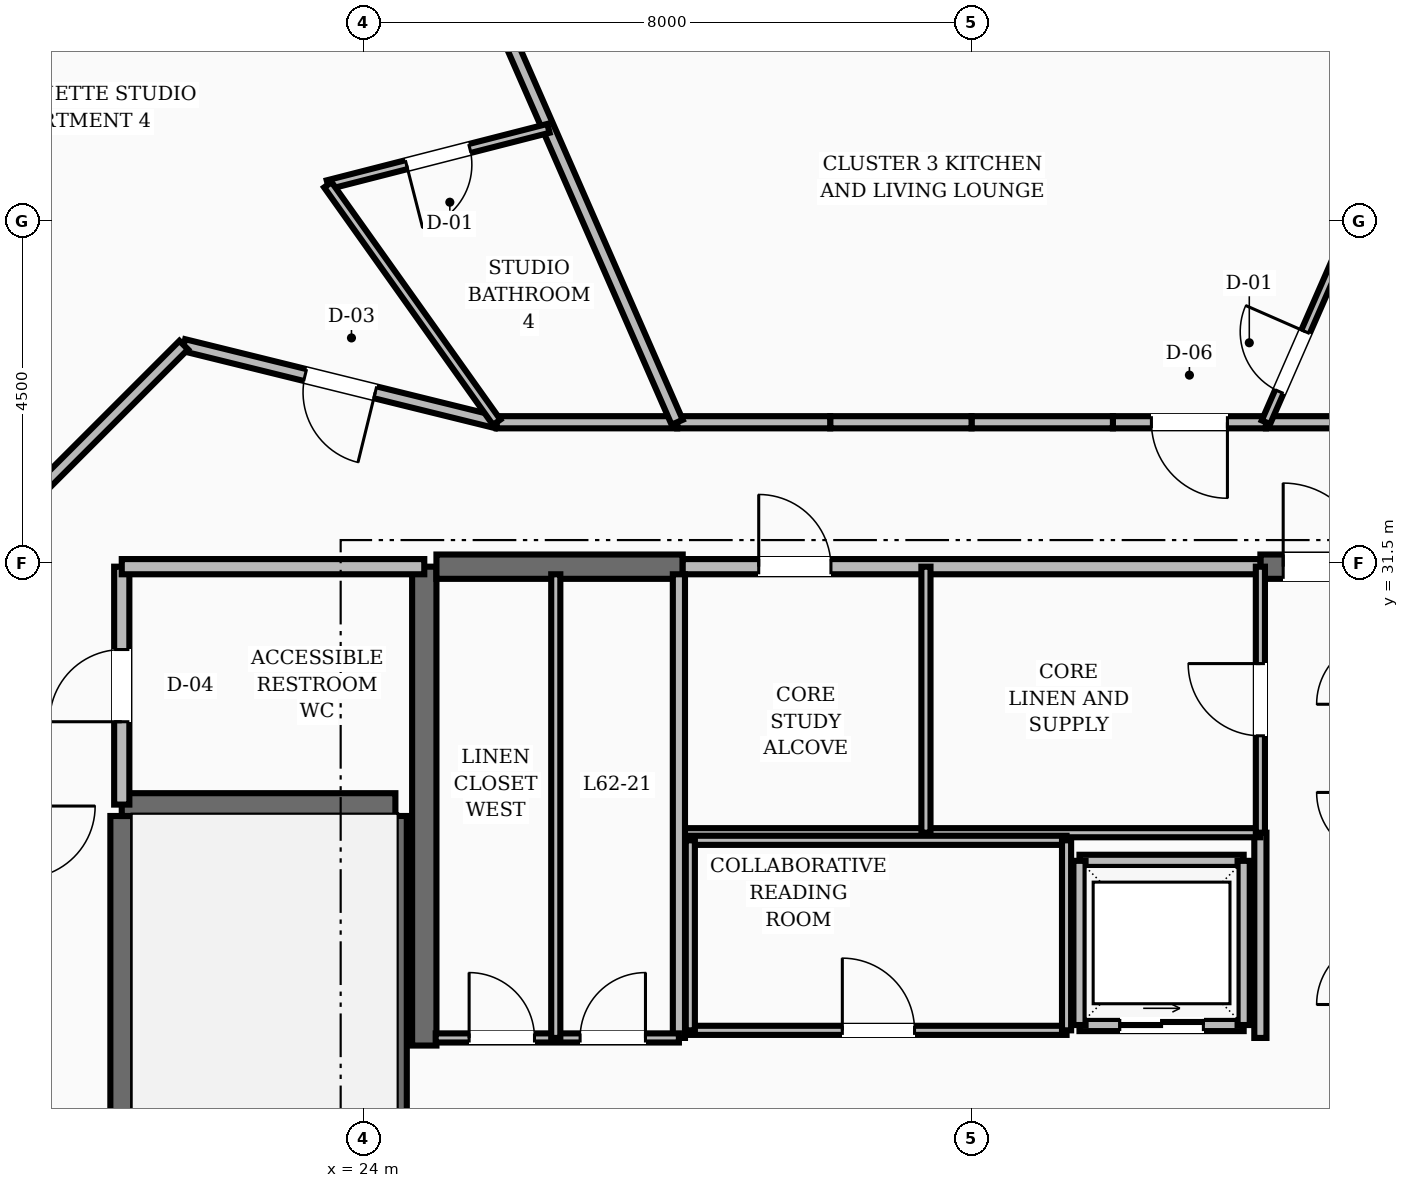
"""IFC4 building model, lengths in metres.
Left out: names, types, materials, properties, quantities, classifications, styles, units other than length and angle.
Written with IfcOpenShell. Run it as: python <this file> out.ifc"""

import sys

from ifc_helpers import new_model, si_unit, direction, frame, frame_2d, origin, place, context, subcontext, project, spatial, rectangle, extrude, element, fill, save


model = new_model("IFC4")
c1 = context("Model", 3, precision=1e-05, world=origin(), true_north=direction((0.0, 1.0)))
c2 = subcontext(c1, "Body", "Model", "MODEL_VIEW")
j1 = project(units=[si_unit("LENGTHUNIT", "METRE"), si_unit("PLANEANGLEUNIT", "RADIAN")], contexts=[c1])
p1 = place(None, origin())
s1 = spatial("IfcSite", under=j1, at=p1, CompositionType="ELEMENT")
p2 = place(p1, origin())
s2 = spatial("IfcBuilding", under=s1, at=p2, CompositionType="ELEMENT")
p3 = place(p2, frame((0.0, 0.0, 240.0)))
s3 = spatial("IfcBuildingStorey", under=s2, at=p3, CompositionType="ELEMENT", Elevation=240.0)
p4 = place(p3, frame((24.8, 25.15, 0.0), z_axis=(0.0, 0.0, 1.0), x_axis=(0.0, 1.0, 0.0)))
e1 = element("IfcWall", 1, at=p4, inside=s3, PredefinedType="SHEAR", context=c2, shape_type="SweptSolid", body=[
    extrude(rectangle(XDim=6.3, YDim=0.32, at=frame_2d((3.15, 0.0))), origin(), (0.0, 0.0, 1.0), 3.6),
])
p5 = place(p3, frame((24.96, 31.45, 0.0), z_axis=(0.0, 0.0, 1.0), x_axis=(1.0, 0.0, 0.0)))
e2 = element("IfcWall", 2, at=p5, inside=s3, PredefinedType="SHEAR", context=c2, shape_type="SweptSolid", body=[
    extrude(rectangle(XDim=3.24, YDim=0.32, at=frame_2d((1.62, 0.0))), origin(), (0.0, 0.0, 1.0), 3.6),
])
p6 = place(p3, frame((35.8, 31.45, 0.0), z_axis=(0.0, 0.0, 1.0), x_axis=(1.0, 0.0, 0.0)))
e3 = element("IfcWall", 3, at=p6, inside=s3, PredefinedType="SHEAR", context=c2, shape_type="SweptSolid", body=[
    extrude(rectangle(XDim=3.24, YDim=0.32, at=frame_2d((1.62, 0.0))), origin(), (0.0, 0.0, 1.0), 3.6),
])
p7 = place(p6, frame((0.3, 0.0, 0.0)))
e4 = element("IfcOpeningElement", 4, at=p7, cuts=e3, PredefinedType="OPENING", context=c2, shape_type="SweptSolid", body=[
    extrude(rectangle(XDim=1.1, YDim=2.1, at=frame_2d((0.55, 1.05))), frame((0.0, 0.17, 0.0), z_axis=(0.0, -1.0, 0.0), x_axis=(1.0, 0.0, 0.0)), (0.0, 0.0, 1.0), 0.34),
])
for number, where, z_axis, x_axis in (
    (5, (20.82, 19.43, 0.0), (0.0, 0.0, 1.0), (0.0, 1.0, 0.0)),
    (6, (24.42, 19.43, 0.0), (0.0, 0.0, 1.0), (0.0, 1.0, 0.0)),
):
    element("IfcWall", number, at=place(p3, frame(where, z_axis=z_axis, x_axis=x_axis)), inside=s3, PredefinedType="SHEAR", context=c2, shape_type="SweptSolid", body=[
        extrude(rectangle(XDim=8.74, YDim=0.3, at=frame_2d((4.37, 0.0))), origin(), (0.0, 0.0, 1.0), 3.6),
    ])
p8 = place(p3, frame((20.82, 28.32, 0.0), z_axis=(0.0, 0.0, 1.0), x_axis=(1.0, 0.0, 0.0)))
e7 = element("IfcWall", 7, at=p8, inside=s3, PredefinedType="SHEAR", context=c2, shape_type="SweptSolid", body=[
    extrude(rectangle(XDim=3.6, YDim=0.3, at=frame_2d((1.8, 0.0))), origin(), (0.0, 0.0, 1.0), 3.6),
])
p9 = place(p3, frame((20.82, 28.32, 0.0), z_axis=(0.0, 0.0, 1.0), x_axis=(0.0, 1.0, 0.0)))
e8 = element("IfcWall", 8, at=p9, inside=s3, PredefinedType="SOLIDWALL", context=c2, shape_type="SweptSolid", body=[
    extrude(rectangle(XDim=3.13, YDim=0.2, at=frame_2d((1.565, 0.0))), origin(), (0.0, 0.0, 1.0), 2.87),
])
p10 = place(p9, frame((1.09, 0.0, 0.0)))
e9 = element("IfcOpeningElement", 9, at=p10, cuts=e8, PredefinedType="OPENING", context=c2, shape_type="SweptSolid", body=[
    extrude(rectangle(XDim=0.95, YDim=2.1, at=frame_2d((0.475, 1.05))), frame((0.0, 0.11, 0.0), z_axis=(0.0, -1.0, 0.0), x_axis=(1.0, 0.0, 0.0)), (0.0, 0.0, 1.0), 0.22),
])
p11 = place(p3, frame((20.82, 31.45, 0.0), z_axis=(0.0, 0.0, 1.0), x_axis=(1.0, 0.0, 0.0)))
e10 = element("IfcWall", 10, at=p11, inside=s3, PredefinedType="SOLIDWALL", context=c2, shape_type="SweptSolid", body=[
    extrude(rectangle(XDim=3.98, YDim=0.2, at=frame_2d((1.99, 0.0))), origin(), (0.0, 0.0, 1.0), 2.87),
])
p12 = place(p3, frame((35.8, 25.25, 0.0), z_axis=(0.0, 0.0, 1.0), x_axis=(0.0, 1.0, 0.0)))
e11 = element("IfcWall", 11, at=p12, inside=s3, PredefinedType="SOLIDWALL", context=c2, shape_type="SweptSolid", body=[
    extrude(rectangle(XDim=2.7, YDim=0.16, at=frame_2d((1.35, 0.0))), origin(), (0.0, 0.0, 1.0), 2.87),
])
p13 = place(p3, frame((33.42, 25.42, 0.0), z_axis=(0.0, 0.0, 1.0), x_axis=(1.0, 0.0, 0.0)))
e12 = element("IfcWall", 12, at=p13, inside=s3, PredefinedType="SOLIDWALL", context=c2, shape_type="SweptSolid", body=[
    extrude(rectangle(XDim=2.16, YDim=0.16, at=frame_2d((1.08, 0.0))), origin(), (0.0, 0.0, 1.0), 2.87),
])
p14 = place(p13, frame((0.53, 0.0, 0.0)))
e13 = element("IfcOpeningElement", 13, at=p14, cuts=e12, PredefinedType="OPENING", context=c2, shape_type="SweptSolid", body=[
    extrude(rectangle(XDim=1.1, YDim=2.15, at=frame_2d((0.55, 1.075))), frame((0.0, 0.09, 0.0), z_axis=(0.0, -1.0, 0.0), x_axis=(1.0, 0.0, 0.0)), (0.0, 0.0, 1.0), 0.18),
])
for number, where, z_axis, x_axis in (
    (14, (33.42, 27.58, 0.0), (0.0, 0.0, 1.0), (1.0, 0.0, 0.0)),
    (15, (33.42, 25.42, 0.0), (0.0, 0.0, 1.0), (0.0, 1.0, 0.0)),
    (16, (35.58, 25.42, 0.0), (0.0, 0.0, 1.0), (0.0, 1.0, 0.0)),
):
    element("IfcWall", number, at=place(p3, frame(where, z_axis=z_axis, x_axis=x_axis)), inside=s3, PredefinedType="SOLIDWALL", context=c2, shape_type="SweptSolid", body=[
        extrude(rectangle(XDim=2.16, YDim=0.16, at=frame_2d((1.08, 0.0))), origin(), (0.0, 0.0, 1.0), 2.87),
    ])
p15 = place(p3, frame((28.2, 31.45, 0.0), z_axis=(0.0, 0.0, 1.0), x_axis=(1.0, 0.0, 0.0)))
e17 = element("IfcWall", 17, at=p15, inside=s3, PredefinedType="SOLIDWALL", context=c2, shape_type="SweptSolid", body=[
    extrude(rectangle(XDim=7.6, YDim=0.2, at=frame_2d((3.8, 0.0))), origin(), (0.0, 0.0, 1.0), 2.87),
])
p16 = place(p15, frame((1.0, 0.0, 0.0)))
e18 = element("IfcOpeningElement", 18, at=p16, cuts=e17, PredefinedType="OPENING", context=c2, shape_type="SweptSolid", body=[
    extrude(rectangle(XDim=0.95, YDim=2.1, at=frame_2d((0.475, 1.05))), frame((0.0, 0.11, 0.0), z_axis=(0.0, -1.0, 0.0), x_axis=(1.0, 0.0, 0.0)), (0.0, 0.0, 1.0), 0.22),
])
p17 = place(p3, frame((28.2, 27.95, 0.0), z_axis=(0.0, 0.0, 1.0), x_axis=(1.0, 0.0, 0.0)))
e19 = element("IfcWall", 19, at=p17, inside=s3, PredefinedType="PARTITIONING", context=c2, shape_type="SweptSolid", body=[
    extrude(rectangle(XDim=7.6, YDim=0.12, at=frame_2d((3.8, 0.0))), origin(), (0.0, 0.0, 1.0), 2.87),
])
p18 = place(p3, frame((35.8, 27.95, 0.0), z_axis=(0.0, 0.0, 1.0), x_axis=(0.0, 1.0, 0.0)))
e20 = element("IfcWall", 20, at=p18, inside=s3, PredefinedType="PARTITIONING", context=c2, shape_type="SweptSolid", body=[
    extrude(rectangle(XDim=3.5, YDim=0.12, at=frame_2d((1.75, 0.0))), origin(), (0.0, 0.0, 1.0), 2.87),
])
p19 = place(p18, frame((1.275, 0.0, 0.0)))
e21 = element("IfcOpeningElement", 21, at=p19, cuts=e20, PredefinedType="OPENING", context=c2, shape_type="SweptSolid", body=[
    extrude(rectangle(XDim=0.95, YDim=2.1, at=frame_2d((0.475, 1.05))), frame((0.0, 0.07, 0.0), z_axis=(0.0, -1.0, 0.0), x_axis=(1.0, 0.0, 0.0)), (0.0, 0.0, 1.0), 0.14),
])
p20 = place(p3, frame((31.4, 27.95, 0.0), z_axis=(0.0, 0.0, 1.0), x_axis=(0.0, 1.0, 0.0)))
e22 = element("IfcWall", 22, at=p20, inside=s3, PredefinedType="PARTITIONING", context=c2, shape_type="SweptSolid", body=[
    extrude(rectangle(XDim=3.5, YDim=0.12, at=frame_2d((1.75, 0.0))), origin(), (0.0, 0.0, 1.0), 2.87),
])
p21 = place(p3, frame((28.3, 25.35, 0.0), z_axis=(0.0, 0.0, 1.0), x_axis=(1.0, 0.0, 0.0)))
e23 = element("IfcWall", 23, at=p21, inside=s3, PredefinedType="PARTITIONING", context=c2, shape_type="SweptSolid", body=[
    extrude(rectangle(XDim=4.95, YDim=0.12, at=frame_2d((2.475, 0.0))), origin(), (0.0, 0.0, 1.0), 2.87),
])
p22 = place(p21, frame((2.0, 0.0, 0.0)))
e24 = element("IfcOpeningElement", 24, at=p22, cuts=e23, PredefinedType="OPENING", context=c2, shape_type="SweptSolid", body=[
    extrude(rectangle(XDim=0.95, YDim=2.1, at=frame_2d((0.475, 1.05))), frame((0.0, 0.07, 0.0), z_axis=(0.0, -1.0, 0.0), x_axis=(1.0, 0.0, 0.0)), (0.0, 0.0, 1.0), 0.14),
])
p23 = place(p3, frame((28.3, 27.85, 0.0), z_axis=(0.0, 0.0, 1.0), x_axis=(1.0, 0.0, 0.0)))
e25 = element("IfcWall", 25, at=p23, inside=s3, PredefinedType="PARTITIONING", context=c2, shape_type="SweptSolid", body=[
    extrude(rectangle(XDim=4.95, YDim=0.12, at=frame_2d((2.475, 0.0))), origin(), (0.0, 0.0, 1.0), 2.87),
])
for number, where, z_axis, x_axis in (
    (26, (28.3, 25.35, 0.0), (0.0, 0.0, 1.0), (0.0, 1.0, 0.0)),
    (27, (33.25, 25.35, 0.0), (0.0, 0.0, 1.0), (0.0, 1.0, 0.0)),
):
    element("IfcWall", number, at=place(p3, frame(where, z_axis=z_axis, x_axis=x_axis)), inside=s3, PredefinedType="PARTITIONING", context=c2, shape_type="SweptSolid", body=[
        extrude(rectangle(XDim=2.5, YDim=0.12, at=frame_2d((1.25, 0.0))), origin(), (0.0, 0.0, 1.0), 2.87),
    ])
p24 = place(p3, frame((28.15, 25.25, 0.0), z_axis=(0.0, 0.0, 1.0), x_axis=(0.0, 1.0, 0.0)))
e28 = element("IfcWall", 28, at=p24, inside=s3, PredefinedType="SOLIDWALL", context=c2, shape_type="SweptSolid", body=[
    extrude(rectangle(XDim=6.1, YDim=0.16, at=frame_2d((3.05, 0.0))), origin(), (0.0, 0.0, 1.0), 2.87),
])
p25 = place(p3, frame((24.95, 25.25, 0.0), z_axis=(0.0, 0.0, 1.0), x_axis=(1.0, 0.0, 0.0)))
e29 = element("IfcWall", 29, at=p25, inside=s3, PredefinedType="PARTITIONING", context=c2, shape_type="SweptSolid", body=[
    extrude(rectangle(XDim=3.2, YDim=0.12, at=frame_2d((1.6, 0.0))), origin(), (0.0, 0.0, 1.0), 2.87),
])
p26 = place(p25, frame((0.44, 0.0, 0.0)))
e30 = element("IfcOpeningElement", 30, at=p26, cuts=e29, PredefinedType="OPENING", context=c2, shape_type="SweptSolid", body=[
    extrude(rectangle(XDim=0.86, YDim=2.1, at=frame_2d((0.43, 1.05))), frame((0.0, 0.07, 0.0), z_axis=(0.0, -1.0, 0.0), x_axis=(1.0, 0.0, 0.0)), (0.0, 0.0, 1.0), 0.14),
])
p27 = place(p25, frame((1.9, 0.0, 0.0)))
e31 = element("IfcOpeningElement", 31, at=p27, cuts=e29, PredefinedType="OPENING", context=c2, shape_type="SweptSolid", body=[
    extrude(rectangle(XDim=0.86, YDim=2.1, at=frame_2d((0.43, 1.05))), frame((0.0, 0.07, 0.0), z_axis=(0.0, -1.0, 0.0), x_axis=(1.0, 0.0, 0.0)), (0.0, 0.0, 1.0), 0.14),
])
p28 = place(p3, frame((26.53, 25.25, 0.0), z_axis=(0.0, 0.0, 1.0), x_axis=(0.0, 1.0, 0.0)))
e32 = element("IfcWall", 32, at=p28, inside=s3, PredefinedType="PARTITIONING", context=c2, shape_type="SweptSolid", body=[
    extrude(rectangle(XDim=6.1, YDim=0.12, at=frame_2d((3.05, 0.0))), origin(), (0.0, 0.0, 1.0), 2.87),
])
p29 = place(p3, frame((38.248, 33.35, 0.0), z_axis=(0.0, 0.0, 1.0), x_axis=(-1.0, 0.0, 0.0)))
e33 = element("IfcWall", 33, at=p29, inside=s3, PredefinedType="SOLIDWALL", context=c2, shape_type="SweptSolid", body=[
    extrude(rectangle(XDim=2.375, YDim=0.16, at=frame_2d((1.188, 0.0))), origin(), (0.0, 0.0, 1.0), 2.87),
])
p30 = place(p3, frame((35.873, 33.35, 0.0), z_axis=(0.0, 0.0, 1.0), x_axis=(-1.0, 0.0, 0.0)))
e34 = element("IfcWall", 34, at=p30, inside=s3, PredefinedType="SOLIDWALL", context=c2, shape_type="SweptSolid", body=[
    extrude(rectangle(XDim=2.013, YDim=0.16, at=frame_2d((1.006, 0.0))), origin(), (0.0, 0.0, 1.0), 2.87),
])
p31 = place(p30, frame((0.507, 0.0, 0.0)))
e35 = element("IfcOpeningElement", 35, at=p31, cuts=e34, PredefinedType="OPENING", context=c2, shape_type="SweptSolid", body=[
    extrude(rectangle(XDim=1.0, YDim=2.1, at=frame_2d((0.5, 1.05))), frame((0.0, 0.09, 0.0), z_axis=(0.0, -1.0, 0.0), x_axis=(1.0, 0.0, 0.0)), (0.0, 0.0, 1.0), 0.18),
])
for number, where, z_axis, x_axis in (
    (36, (33.86, 33.35, 0.0), (0.0, 0.0, 1.0), (-1.0, 0.0, 0.0)),
    (37, (32.0, 33.35, 0.0), (0.0, 0.0, 1.0), (-1.0, 0.0, 0.0)),
):
    element("IfcWall", number, at=place(p3, frame(where, z_axis=z_axis, x_axis=x_axis)), inside=s3, PredefinedType="SOLIDWALL", context=c2, shape_type="SweptSolid", body=[
        extrude(rectangle(XDim=1.86, YDim=0.16, at=frame_2d((0.93, 0.0))), origin(), (0.0, 0.0, 1.0), 2.87),
    ])
p32 = place(p3, frame((30.14, 33.35, 0.0), z_axis=(0.0, 0.0, 1.0), x_axis=(-1.0, 0.0, 0.0)))
e38 = element("IfcWall", 38, at=p32, inside=s3, PredefinedType="SOLIDWALL", context=c2, shape_type="SweptSolid", body=[
    extrude(rectangle(XDim=2.013, YDim=0.16, at=frame_2d((1.006, 0.0))), origin(), (0.0, 0.0, 1.0), 2.87),
])
p33 = place(p3, frame((28.127, 33.35, 0.0), z_axis=(0.0, 0.0, 1.0), x_axis=(-1.0, 0.0, 0.0)))
e39 = element("IfcWall", 39, at=p33, inside=s3, PredefinedType="SOLIDWALL", context=c2, shape_type="SweptSolid", body=[
    extrude(rectangle(XDim=2.375, YDim=0.16, at=frame_2d((1.188, 0.0))), origin(), (0.0, 0.0, 1.0), 2.87),
])
p34 = place(p3, frame((25.752, 33.35, 0.0), z_axis=(0.0, 0.0, 1.0), x_axis=(-0.970939799552, 0.239323850978, 0.0)))
e40 = element("IfcWall", 40, at=p34, inside=s3, PredefinedType="SOLIDWALL", context=c2, shape_type="SweptSolid", body=[
    extrude(rectangle(XDim=4.241, YDim=0.16, at=frame_2d((2.12, 0.0))), origin(), (0.0, 0.0, 1.0), 2.87),
])
p35 = place(p34, frame((1.646, 0.0, 0.0)))
e41 = element("IfcOpeningElement", 41, at=p35, cuts=e40, PredefinedType="OPENING", context=c2, shape_type="SweptSolid", body=[
    extrude(rectangle(XDim=0.95, YDim=2.1, at=frame_2d((0.475, 1.05))), frame((0.0, 0.09, 0.0), z_axis=(0.0, -1.0, 0.0), x_axis=(1.0, 0.0, 0.0)), (0.0, 0.0, 1.0), 0.18),
])
p36 = place(p3, frame((21.635, 34.365, 0.0), z_axis=(0.0, 0.0, 1.0), x_axis=(-0.707106781187, -0.707106781187, 0.0)))
e42 = element("IfcWall", 42, at=p36, inside=s3, PredefinedType="SOLIDWALL", context=c2, shape_type="SweptSolid", body=[
    extrude(rectangle(XDim=2.916, YDim=0.16, at=frame_2d((1.458, 0.0))), origin(), (0.0, 0.0, 1.0), 2.87),
])
p37 = place(p3, frame((35.873, 33.35, 0.0), z_axis=(0.0, 0.0, 1.0), x_axis=(0.401215916975, 0.915983508566, 0.0)))
e43 = element("IfcWall", 43, at=p37, inside=s3, PredefinedType="PARTITIONING", context=c2, shape_type="SweptSolid", body=[
    extrude(rectangle(XDim=3.999, YDim=0.12, at=frame_2d((2.0, 0.0))), origin(), (0.0, 0.0, 1.0), 2.87),
])
p38 = place(p37, frame((0.44, 0.0, 0.0)))
e44 = element("IfcOpeningElement", 44, at=p38, cuts=e43, PredefinedType="OPENING", context=c2, shape_type="SweptSolid", body=[
    extrude(rectangle(XDim=0.86, YDim=2.1, at=frame_2d((0.43, 1.05))), frame((0.0, 0.07, 0.0), z_axis=(0.0, -1.0, 0.0), x_axis=(1.0, 0.0, 0.0)), (0.0, 0.0, 1.0), 0.14),
])
p39 = place(p3, frame((28.127, 33.35, 0.0), z_axis=(0.0, 0.0, 1.0), x_axis=(-0.401173204802, 0.916002216017, 0.0)))
e45 = element("IfcWall", 45, at=p39, inside=s3, PredefinedType="SOLIDWALL", context=c2, shape_type="SweptSolid", body=[
    extrude(rectangle(XDim=11.058, YDim=0.16, at=frame_2d((5.529, 0.0))), origin(), (0.0, 0.0, 1.0), 2.87),
])
p40 = place(p3, frame((26.434, 37.217, 0.0), z_axis=(0.0, 0.0, 1.0), x_axis=(-0.968819540563, -0.247767426879, 0.0)))
e46 = element("IfcWall", 46, at=p40, inside=s3, PredefinedType="PARTITIONING", context=c2, shape_type="SweptSolid", body=[
    extrude(rectangle(XDim=2.996, YDim=0.12, at=frame_2d((1.498, 0.0))), origin(), (0.0, 0.0, 1.0), 2.87),
])
p41 = place(p40, frame((1.068, 0.0, 0.0)))
e47 = element("IfcOpeningElement", 47, at=p41, cuts=e46, PredefinedType="OPENING", context=c2, shape_type="SweptSolid", body=[
    extrude(rectangle(XDim=0.86, YDim=2.1, at=frame_2d((0.43, 1.05))), frame((0.0, 0.07, 0.0), z_axis=(0.0, -1.0, 0.0), x_axis=(1.0, 0.0, 0.0)), (0.0, 0.0, 1.0), 0.14),
])
p42 = place(p3, frame((25.752, 33.35, 0.0), z_axis=(0.0, 0.0, 1.0), x_axis=(-0.579393118197, 0.81504822838, 0.0)))
e48 = element("IfcWall", 48, at=p42, inside=s3, PredefinedType="PARTITIONING", context=c2, shape_type="SweptSolid", body=[
    extrude(rectangle(XDim=3.833, YDim=0.12, at=frame_2d((1.917, 0.0))), origin(), (0.0, 0.0, 1.0), 2.87),
])
p43 = place(p10, origin())
e49 = element("IfcDoor", 49, at=p43, inside=s3, OperationType="SINGLE_SWING_LEFT", PredefinedType="DOOR", context=c2, shape_type="SweptSolid", body=[
    extrude(rectangle(XDim=0.95, YDim=2.1, at=frame_2d((0.475, 1.05))), frame((0.0, 0.025, 0.0), z_axis=(0.0, -1.0, 0.0), x_axis=(1.0, 0.0, 0.0)), (0.0, 0.0, 1.0), 0.05),
])
fill(e9, e49)
p44 = place(p7, origin())
e50 = element("IfcDoor", 50, at=p44, inside=s3, OperationType="SINGLE_SWING_LEFT", PredefinedType="DOOR", context=c2, shape_type="SweptSolid", body=[
    extrude(rectangle(XDim=1.1, YDim=2.1, at=frame_2d((0.55, 1.05))), frame((0.0, 0.025, 0.0), z_axis=(0.0, -1.0, 0.0), x_axis=(1.0, 0.0, 0.0)), (0.0, 0.0, 1.0), 0.05),
])
fill(e4, e50)
p45 = place(p14, origin())
e51 = element("IfcDoor", 51, at=p45, inside=s3, OperationType="SLIDING_TO_RIGHT", PredefinedType="DOOR", context=c2, shape_type="SweptSolid", body=[
    extrude(rectangle(XDim=1.1, YDim=2.15, at=frame_2d((0.55, 1.075))), frame((0.0, 0.025, 0.0), z_axis=(0.0, -1.0, 0.0), x_axis=(1.0, 0.0, 0.0)), (0.0, 0.0, 1.0), 0.05),
])
fill(e13, e51)
p46 = place(p16, origin())
e52 = element("IfcDoor", 52, at=p46, inside=s3, OperationType="SINGLE_SWING_LEFT", PredefinedType="DOOR", context=c2, shape_type="SweptSolid", body=[
    extrude(rectangle(XDim=0.95, YDim=2.1, at=frame_2d((0.475, 1.05))), frame((0.0, 0.025, 0.0), z_axis=(0.0, -1.0, 0.0), x_axis=(1.0, 0.0, 0.0)), (0.0, 0.0, 1.0), 0.05),
])
fill(e18, e52)
p47 = place(p19, origin())
e53 = element("IfcDoor", 53, at=p47, inside=s3, OperationType="SINGLE_SWING_RIGHT", PredefinedType="DOOR", context=c2, shape_type="SweptSolid", body=[
    extrude(rectangle(XDim=0.95, YDim=2.1, at=frame_2d((0.475, 1.05))), frame((0.0, 0.025, 0.0), z_axis=(0.0, -1.0, 0.0), x_axis=(1.0, 0.0, 0.0)), (0.0, 0.0, 1.0), 0.05),
])
fill(e21, e53)
p48 = place(p22, origin())
e54 = element("IfcDoor", 54, at=p48, inside=s3, OperationType="SINGLE_SWING_LEFT", PredefinedType="DOOR", context=c2, shape_type="SweptSolid", body=[
    extrude(rectangle(XDim=0.95, YDim=2.1, at=frame_2d((0.475, 1.05))), frame((0.0, 0.025, 0.0), z_axis=(0.0, -1.0, 0.0), x_axis=(1.0, 0.0, 0.0)), (0.0, 0.0, 1.0), 0.05),
])
fill(e24, e54)
p49 = place(p26, origin())
e55 = element("IfcDoor", 55, at=p49, inside=s3, OperationType="SINGLE_SWING_LEFT", PredefinedType="DOOR", context=c2, shape_type="SweptSolid", body=[
    extrude(rectangle(XDim=0.86, YDim=2.1, at=frame_2d((0.43, 1.05))), frame((0.0, 0.025, 0.0), z_axis=(0.0, -1.0, 0.0), x_axis=(1.0, 0.0, 0.0)), (0.0, 0.0, 1.0), 0.05),
])
fill(e30, e55)
p50 = place(p27, origin())
e56 = element("IfcDoor", 56, at=p50, inside=s3, OperationType="SINGLE_SWING_RIGHT", PredefinedType="DOOR", context=c2, shape_type="SweptSolid", body=[
    extrude(rectangle(XDim=0.86, YDim=2.1, at=frame_2d((0.43, 1.05))), frame((0.0, 0.025, 0.0), z_axis=(0.0, -1.0, 0.0), x_axis=(1.0, 0.0, 0.0)), (0.0, 0.0, 1.0), 0.05),
])
fill(e31, e56)
p51 = place(p38, origin())
e57 = element("IfcDoor", 57, at=p51, inside=s3, OperationType="SINGLE_SWING_RIGHT", PredefinedType="DOOR", context=c2, shape_type="SweptSolid", body=[
    extrude(rectangle(XDim=0.86, YDim=2.1, at=frame_2d((0.43, 1.05))), frame((0.0, 0.025, 0.0), z_axis=(0.0, -1.0, 0.0), x_axis=(1.0, 0.0, 0.0)), (0.0, 0.0, 1.0), 0.05),
])
fill(e44, e57)
p52 = place(p31, origin())
e58 = element("IfcDoor", 58, at=p52, inside=s3, OperationType="SINGLE_SWING_LEFT", PredefinedType="DOOR", context=c2, shape_type="SweptSolid", body=[
    extrude(rectangle(XDim=1.0, YDim=2.1, at=frame_2d((0.5, 1.05))), frame((0.0, 0.025, 0.0), z_axis=(0.0, -1.0, 0.0), x_axis=(1.0, 0.0, 0.0)), (0.0, 0.0, 1.0), 0.05),
])
fill(e35, e58)
p53 = place(p41, origin())
e59 = element("IfcDoor", 59, at=p53, inside=s3, OperationType="SINGLE_SWING_RIGHT", PredefinedType="DOOR", context=c2, shape_type="SweptSolid", body=[
    extrude(rectangle(XDim=0.86, YDim=2.1, at=frame_2d((0.43, 1.05))), frame((0.0, 0.025, 0.0), z_axis=(0.0, -1.0, 0.0), x_axis=(1.0, 0.0, 0.0)), (0.0, 0.0, 1.0), 0.05),
])
fill(e47, e59)
p54 = place(p35, origin())
e60 = element("IfcDoor", 60, at=p54, inside=s3, OperationType="SINGLE_SWING_LEFT", PredefinedType="DOOR", context=c2, shape_type="SweptSolid", body=[
    extrude(rectangle(XDim=0.95, YDim=2.1, at=frame_2d((0.475, 1.05))), frame((0.0, 0.025, 0.0), z_axis=(0.0, -1.0, 0.0), x_axis=(1.0, 0.0, 0.0)), (0.0, 0.0, 1.0), 0.05),
])
fill(e41, e60)
save(model, sys.argv[1])
